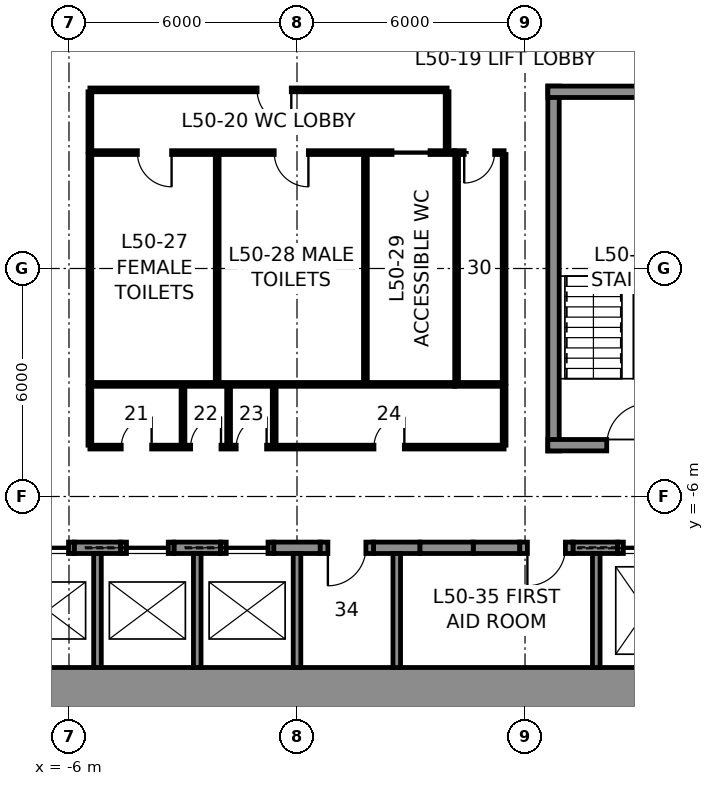
"""IFC4 building model, lengths in metres.
Left out: names, types, materials, properties, quantities, classifications, styles, units other than length and angle.
Written with IfcOpenShell. Run it as: python <this file> out.ifc"""

import sys

from ifc_helpers import new_model, si_unit, direction, frame, frame_2d, origin, place, context, subcontext, project, spatial, rectangle, extrude, element, fill, save


model = new_model("IFC4")
c1 = context("Model", 3, precision=1e-05, world=origin(), true_north=direction((0.0, 1.0)))
c2 = subcontext(c1, "Body", "Model", "MODEL_VIEW")
j1 = project(units=[si_unit("LENGTHUNIT", "METRE"), si_unit("PLANEANGLEUNIT", "RADIAN")], contexts=[c1])
p1 = place(None, origin())
s1 = spatial("IfcSite", under=j1, at=p1, CompositionType="ELEMENT")
p2 = place(p1, origin())
s2 = spatial("IfcBuilding", under=s1, at=p2, CompositionType="ELEMENT")
p3 = place(p2, frame((0.0, 0.0, 229.8)))
s3 = spatial("IfcBuildingStorey", under=s2, at=p3, CompositionType="ELEMENT", Elevation=229.8)
p4 = place(p3, frame((12.0, -11.25, 0.0), z_axis=(0.0, 0.0, 1.0), x_axis=(-1.0, 0.0, 0.0)))
e1 = element("IfcWall", 1, at=p4, inside=s3, PredefinedType="SHEAR", context=c2, shape_type="SweptSolid", body=[
    extrude(rectangle(XDim=24.0, YDim=1.5, at=frame_2d((12.0, 0.0))), origin(), (0.0, 0.0, 1.0), 4.0),
])
for number, where, z_axis, x_axis in (
    (2, (-5.863, -7.35, 0.0), (0.0, 0.0, 1.0), (1.0, 0.0, 0.0)),
    (3, (-3.238, -7.35, 0.0), (0.0, 0.0, 1.0), (1.0, 0.0, 0.0)),
    (4, (-0.613, -7.35, 0.0), (0.0, 0.0, 1.0), (1.0, 0.0, 0.0)),
    (5, (2.012, -7.35, 0.0), (0.0, 0.0, 1.0), (1.0, 0.0, 0.0)),
    (6, (4.637, -7.35, 0.0), (0.0, 0.0, 1.0), (1.0, 0.0, 0.0)),
):
    element("IfcWall", number, at=place(p3, frame(where, z_axis=z_axis, x_axis=x_axis)), inside=s3, PredefinedType="SHEAR", context=c2, shape_type="SweptSolid", body=[
        extrude(rectangle(XDim=1.225, YDim=0.3, at=frame_2d((0.613, 0.0))), origin(), (0.0, 0.0, 1.0), 4.0),
    ])
p5 = place(p3, frame((7.262, -7.35, 0.0), z_axis=(0.0, 0.0, 1.0), x_axis=(1.0, 0.0, 0.0)))
e7 = element("IfcWall", 7, at=p5, inside=s3, PredefinedType="SHEAR", context=c2, shape_type="SweptSolid", body=[
    extrude(rectangle(XDim=1.175, YDim=0.3, at=frame_2d((0.587, 0.0))), origin(), (0.0, 0.0, 1.0), 4.0),
])
p6 = place(p3, frame((-7.262, -7.35, 0.0), z_axis=(0.0, 0.0, 1.0), x_axis=(1.0, 0.0, 0.0)))
e8 = element("IfcWall", 8, at=p6, inside=s3, PredefinedType="PARTITIONING", context=c2, shape_type="SweptSolid", body=[
    extrude(rectangle(XDim=1.4, YDim=0.3, at=frame_2d((0.7, 0.0))), origin(), (0.0, 0.0, 1.0), 4.0),
])
p7 = place(p6, frame((0.15, 0.0, 0.0)))
e9 = element("IfcOpeningElement", 9, at=p7, cuts=e8, PredefinedType="OPENING", context=c2, shape_type="SweptSolid", body=[
    extrude(rectangle(XDim=1.1, YDim=2.3, at=frame_2d((0.55, 1.15))), frame((0.0, 0.16, 0.0), z_axis=(0.0, -1.0, 0.0), x_axis=(1.0, 0.0, 0.0)), (0.0, 0.0, 1.0), 0.32),
])
p8 = place(p3, frame((-4.637, -7.35, 0.0), z_axis=(0.0, 0.0, 1.0), x_axis=(1.0, 0.0, 0.0)))
e10 = element("IfcWall", 10, at=p8, inside=s3, PredefinedType="PARTITIONING", context=c2, shape_type="SweptSolid", body=[
    extrude(rectangle(XDim=1.4, YDim=0.3, at=frame_2d((0.7, 0.0))), origin(), (0.0, 0.0, 1.0), 4.0),
])
p9 = place(p8, frame((0.15, 0.0, 0.0)))
e11 = element("IfcOpeningElement", 11, at=p9, cuts=e10, PredefinedType="OPENING", context=c2, shape_type="SweptSolid", body=[
    extrude(rectangle(XDim=1.1, YDim=2.3, at=frame_2d((0.55, 1.15))), frame((0.0, 0.16, 0.0), z_axis=(0.0, -1.0, 0.0), x_axis=(1.0, 0.0, 0.0)), (0.0, 0.0, 1.0), 0.32),
])
p10 = place(p3, frame((-2.012, -7.35, 0.0), z_axis=(0.0, 0.0, 1.0), x_axis=(1.0, 0.0, 0.0)))
e12 = element("IfcWall", 12, at=p10, inside=s3, PredefinedType="PARTITIONING", context=c2, shape_type="SweptSolid", body=[
    extrude(rectangle(XDim=1.4, YDim=0.3, at=frame_2d((0.7, 0.0))), origin(), (0.0, 0.0, 1.0), 4.0),
])
p11 = place(p10, frame((0.15, 0.0, 0.0)))
e13 = element("IfcOpeningElement", 13, at=p11, cuts=e12, PredefinedType="OPENING", context=c2, shape_type="SweptSolid", body=[
    extrude(rectangle(XDim=1.1, YDim=2.3, at=frame_2d((0.55, 1.15))), frame((0.0, 0.16, 0.0), z_axis=(0.0, -1.0, 0.0), x_axis=(1.0, 0.0, 0.0)), (0.0, 0.0, 1.0), 0.32),
])
p12 = place(p3, frame((0.613, -7.35, 0.0), z_axis=(0.0, 0.0, 1.0), x_axis=(1.0, 0.0, 0.0)))
e14 = element("IfcWall", 14, at=p12, inside=s3, PredefinedType="PARTITIONING", context=c2, shape_type="SweptSolid", body=[
    extrude(rectangle(XDim=1.4, YDim=0.3, at=frame_2d((0.7, 0.0))), origin(), (0.0, 0.0, 1.0), 4.0),
])
p13 = place(p12, frame((0.2, 0.0, 0.0)))
e15 = element("IfcOpeningElement", 15, at=p13, cuts=e14, PredefinedType="OPENING", context=c2, shape_type="SweptSolid", body=[
    extrude(rectangle(XDim=1.0, YDim=2.3, at=frame_2d((0.5, 1.15))), frame((0.0, 0.16, 0.0), z_axis=(0.0, -1.0, 0.0), x_axis=(1.0, 0.0, 0.0)), (0.0, 0.0, 1.0), 0.32),
])
p14 = place(p3, frame((3.238, -7.35, 0.0), z_axis=(0.0, 0.0, 1.0), x_axis=(1.0, 0.0, 0.0)))
e16 = element("IfcWall", 16, at=p14, inside=s3, PredefinedType="PARTITIONING", context=c2, shape_type="SweptSolid", body=[
    extrude(rectangle(XDim=1.4, YDim=0.3, at=frame_2d((0.7, 0.0))), origin(), (0.0, 0.0, 1.0), 4.0),
])
p15 = place(p3, frame((5.863, -7.35, 0.0), z_axis=(0.0, 0.0, 1.0), x_axis=(1.0, 0.0, 0.0)))
e17 = element("IfcWall", 17, at=p15, inside=s3, PredefinedType="PARTITIONING", context=c2, shape_type="SweptSolid", body=[
    extrude(rectangle(XDim=1.4, YDim=0.3, at=frame_2d((0.7, 0.0))), origin(), (0.0, 0.0, 1.0), 4.0),
])
p16 = place(p15, frame((0.2, 0.0, 0.0)))
e18 = element("IfcOpeningElement", 18, at=p16, cuts=e17, PredefinedType="OPENING", context=c2, shape_type="SweptSolid", body=[
    extrude(rectangle(XDim=1.0, YDim=2.3, at=frame_2d((0.5, 1.15))), frame((0.0, 0.16, 0.0), z_axis=(0.0, -1.0, 0.0), x_axis=(1.0, 0.0, 0.0)), (0.0, 0.0, 1.0), 0.32),
])
p17 = place(p3, frame((8.438, -7.35, 0.0), z_axis=(0.0, 0.0, 1.0), x_axis=(1.0, 0.0, 0.0)))
e19 = element("IfcWall", 19, at=p17, inside=s3, PredefinedType="PARTITIONING", context=c2, shape_type="SweptSolid", body=[
    extrude(rectangle(XDim=1.5, YDim=0.3, at=frame_2d((0.75, 0.0))), origin(), (0.0, 0.0, 1.0), 4.0),
])
p18 = place(p17, frame((0.15, 0.0, 0.0)))
e20 = element("IfcOpeningElement", 20, at=p18, cuts=e19, PredefinedType="OPENING", context=c2, shape_type="SweptSolid", body=[
    extrude(rectangle(XDim=1.2, YDim=2.3, at=frame_2d((0.6, 1.15))), frame((0.0, 0.16, 0.0), z_axis=(0.0, -1.0, 0.0), x_axis=(1.0, 0.0, 0.0)), (0.0, 0.0, 1.0), 0.32),
])
for number, where, z_axis, x_axis in (
    (21, (-5.25, -10.5, 0.0), (0.0, 0.0, 1.0), (0.0, 1.0, 0.0)),
    (22, (-2.625, -10.5, 0.0), (0.0, 0.0, 1.0), (0.0, 1.0, 0.0)),
    (23, (0.0, -10.5, 0.0), (0.0, 0.0, 1.0), (0.0, 1.0, 0.0)),
    (24, (2.625, -10.5, 0.0), (0.0, 0.0, 1.0), (0.0, 1.0, 0.0)),
    (25, (7.875, -10.5, 0.0), (0.0, 0.0, 1.0), (0.0, 1.0, 0.0)),
):
    element("IfcWall", number, at=place(p3, frame(where, z_axis=z_axis, x_axis=x_axis)), inside=s3, PredefinedType="PARTITIONING", context=c2, shape_type="SweptSolid", body=[
        extrude(rectangle(XDim=3.0, YDim=0.2, at=frame_2d((1.5, 0.0))), origin(), (0.0, 0.0, 1.0), 4.0),
    ])
p19 = place(p3, frame((6.75, -4.8, 0.0), z_axis=(0.0, 0.0, 1.0), x_axis=(0.0, 1.0, 0.0)))
e26 = element("IfcWall", 26, at=p19, inside=s3, PredefinedType="SOLIDWALL", context=c2, shape_type="SweptSolid", body=[
    extrude(rectangle(XDim=9.6, YDim=0.3, at=frame_2d((4.8, 0.0))), origin(), (0.0, 0.0, 1.0), 3.75),
])
p20 = place(p3, frame((6.6, 4.65, 0.0), z_axis=(0.0, 0.0, 1.0), x_axis=(1.0, 0.0, 0.0)))
e27 = element("IfcWall", 27, at=p20, inside=s3, PredefinedType="SOLIDWALL", context=c2, shape_type="SweptSolid", body=[
    extrude(rectangle(XDim=3.9, YDim=0.3, at=frame_2d((1.95, 0.0))), origin(), (0.0, 0.0, 1.0), 3.75),
])
p21 = place(p3, frame((10.5, -4.65, 0.0), z_axis=(0.0, 0.0, 1.0), x_axis=(-1.0, 0.0, 0.0)))
e28 = element("IfcWall", 28, at=p21, inside=s3, PredefinedType="SOLIDWALL", context=c2, shape_type="SweptSolid", body=[
    extrude(rectangle(XDim=3.9, YDim=0.3, at=frame_2d((1.95, 0.0))), origin(), (0.0, 0.0, 1.0), 3.75),
])
p22 = place(p21, frame((1.25, 0.0, 0.0)))
e29 = element("IfcOpeningElement", 29, at=p22, cuts=e28, PredefinedType="OPENING", context=c2, shape_type="SweptSolid", body=[
    extrude(rectangle(XDim=1.1, YDim=2.3, at=frame_2d((0.55, 1.15))), frame((0.0, 0.16, 0.0), z_axis=(0.0, -1.0, 0.0), x_axis=(1.0, 0.0, 0.0)), (0.0, 0.0, 1.0), 0.32),
])
p23 = place(p3, frame((-5.45, 3.05, 0.0), z_axis=(0.0, 0.0, 1.0), x_axis=(1.0, 0.0, 0.0)))
e30 = element("IfcWall", 30, at=p23, inside=s3, PredefinedType="PARTITIONING", context=c2, shape_type="SweptSolid", body=[
    extrude(rectangle(XDim=9.6, YDim=0.1, at=frame_2d((4.8, 0.0))), origin(), (0.0, 0.0, 1.0), 3.75),
])
p24 = place(p23, frame((1.25, 0.0, 0.0)))
e31 = element("IfcOpeningElement", 31, at=p24, cuts=e30, PredefinedType="OPENING", context=c2, shape_type="SweptSolid", body=[
    extrude(rectangle(XDim=0.9, YDim=2.3, at=frame_2d((0.45, 1.15))), frame((0.0, 0.06, 0.0), z_axis=(0.0, -1.0, 0.0), x_axis=(1.0, 0.0, 0.0)), (0.0, 0.0, 1.0), 0.12),
])
p25 = place(p23, frame((4.85, 0.0, 0.0)))
e32 = element("IfcOpeningElement", 32, at=p25, cuts=e30, PredefinedType="OPENING", context=c2, shape_type="SweptSolid", body=[
    extrude(rectangle(XDim=0.9, YDim=2.3, at=frame_2d((0.45, 1.15))), frame((0.0, 0.06, 0.0), z_axis=(0.0, -1.0, 0.0), x_axis=(1.0, 0.0, 0.0)), (0.0, 0.0, 1.0), 0.12),
])
p26 = place(p23, frame((7.95, 0.0, 0.0)))
e33 = element("IfcOpeningElement", 33, at=p26, cuts=e30, PredefinedType="OPENING", context=c2, shape_type="SweptSolid", body=[
    extrude(rectangle(XDim=1.0, YDim=2.3, at=frame_2d((0.5, 1.15))), frame((0.0, 0.06, 0.0), z_axis=(0.0, -1.0, 0.0), x_axis=(1.0, 0.0, 0.0)), (0.0, 0.0, 1.0), 0.12),
])
p27 = place(p3, frame((4.15, 3.05, 0.0), z_axis=(0.0, 0.0, 1.0), x_axis=(1.0, 0.0, 0.0)))
e34 = element("IfcWall", 34, at=p27, inside=s3, PredefinedType="PARTITIONING", context=c2, shape_type="SweptSolid", body=[
    extrude(rectangle(XDim=1.3, YDim=0.1, at=frame_2d((0.65, 0.0))), origin(), (0.0, 0.0, 1.0), 3.75),
])
p28 = place(p27, frame((0.25, 0.0, 0.0)))
e35 = element("IfcOpeningElement", 35, at=p28, cuts=e34, PredefinedType="OPENING", context=c2, shape_type="SweptSolid", body=[
    extrude(rectangle(XDim=0.8, YDim=2.3, at=frame_2d((0.4, 1.15))), frame((0.0, 0.06, 0.0), z_axis=(0.0, -1.0, 0.0), x_axis=(1.0, 0.0, 0.0)), (0.0, 0.0, 1.0), 0.12),
])
p29 = place(p3, frame((4.15, -3.05, 0.0), z_axis=(0.0, 0.0, 1.0), x_axis=(-1.0, 0.0, 0.0)))
e36 = element("IfcWall", 36, at=p29, inside=s3, PredefinedType="PARTITIONING", context=c2, shape_type="SweptSolid", body=[
    extrude(rectangle(XDim=9.6, YDim=0.1, at=frame_2d((4.8, 0.0))), origin(), (0.0, 0.0, 1.0), 3.75),
])
p30 = place(p3, frame((5.45, -3.05, 0.0), z_axis=(0.0, 0.0, 1.0), x_axis=(-1.0, 0.0, 0.0)))
e37 = element("IfcWall", 37, at=p30, inside=s3, PredefinedType="PARTITIONING", context=c2, shape_type="SweptSolid", body=[
    extrude(rectangle(XDim=1.3, YDim=0.1, at=frame_2d((0.65, 0.0))), origin(), (0.0, 0.0, 1.0), 3.75),
])
for number, where, z_axis, x_axis in (
    (38, (5.45, 3.0, 0.0), (0.0, 0.0, 1.0), (0.0, -1.0, 0.0)),
    (39, (-5.45, -3.0, 0.0), (0.0, 0.0, 1.0), (0.0, 1.0, 0.0)),
    (40, (-2.1, -3.0, 0.0), (0.0, 0.0, 1.0), (0.0, 1.0, 0.0)),
    (41, (1.8, -3.0, 0.0), (0.0, 0.0, 1.0), (0.0, 1.0, 0.0)),
    (42, (4.2, -3.0, 0.0), (0.0, 0.0, 1.0), (0.0, 1.0, 0.0)),
):
    element("IfcWall", number, at=place(p3, frame(where, z_axis=z_axis, x_axis=x_axis)), inside=s3, PredefinedType="PARTITIONING", context=c2, shape_type="SweptSolid", body=[
        extrude(rectangle(XDim=6.0, YDim=0.1, at=frame_2d((3.0, 0.0))), origin(), (0.0, 0.0, 1.0), 3.75),
    ])
p31 = place(p3, frame((-5.45, 4.7, 0.0), z_axis=(0.0, 0.0, 1.0), x_axis=(1.0, 0.0, 0.0)))
e43 = element("IfcWall", 43, at=p31, inside=s3, PredefinedType="PARTITIONING", context=c2, shape_type="SweptSolid", body=[
    extrude(rectangle(XDim=9.4, YDim=0.1, at=frame_2d((4.7, 0.0))), origin(), (0.0, 0.0, 1.0), 3.75),
])
p32 = place(p31, frame((4.4, 0.0, 0.0)))
e44 = element("IfcOpeningElement", 44, at=p32, cuts=e43, PredefinedType="OPENING", context=c2, shape_type="SweptSolid", body=[
    extrude(rectangle(XDim=0.9, YDim=2.3, at=frame_2d((0.45, 1.15))), frame((0.0, 0.06, 0.0), z_axis=(0.0, -1.0, 0.0), x_axis=(1.0, 0.0, 0.0)), (0.0, 0.0, 1.0), 0.12),
])
for number, where, z_axis, x_axis in (
    (45, (-5.45, 3.1, 0.0), (0.0, 0.0, 1.0), (0.0, 1.0, 0.0)),
    (46, (3.95, 3.1, 0.0), (0.0, 0.0, 1.0), (0.0, 1.0, 0.0)),
):
    element("IfcWall", number, at=place(p3, frame(where, z_axis=z_axis, x_axis=x_axis)), inside=s3, PredefinedType="PARTITIONING", context=c2, shape_type="SweptSolid", body=[
        extrude(rectangle(XDim=1.55, YDim=0.1, at=frame_2d((0.775, 0.0))), origin(), (0.0, 0.0, 1.0), 3.75),
    ])
p33 = place(p3, frame((5.45, -4.7, 0.0), z_axis=(0.0, 0.0, 1.0), x_axis=(-1.0, 0.0, 0.0)))
e47 = element("IfcWall", 47, at=p33, inside=s3, PredefinedType="PARTITIONING", context=c2, shape_type="SweptSolid", body=[
    extrude(rectangle(XDim=10.9, YDim=0.1, at=frame_2d((5.45, 0.0))), origin(), (0.0, 0.0, 1.0), 3.75),
])
p34 = place(p33, frame((9.275, 0.0, 0.0)))
e48 = element("IfcOpeningElement", 48, at=p34, cuts=e47, PredefinedType="OPENING", context=c2, shape_type="SweptSolid", body=[
    extrude(rectangle(XDim=0.8, YDim=2.3, at=frame_2d((0.4, 1.15))), frame((0.0, 0.06, 0.0), z_axis=(0.0, -1.0, 0.0), x_axis=(1.0, 0.0, 0.0)), (0.0, 0.0, 1.0), 0.12),
])
p35 = place(p33, frame((7.45, 0.0, 0.0)))
e49 = element("IfcOpeningElement", 49, at=p35, cuts=e47, PredefinedType="OPENING", context=c2, shape_type="SweptSolid", body=[
    extrude(rectangle(XDim=0.8, YDim=2.3, at=frame_2d((0.4, 1.15))), frame((0.0, 0.06, 0.0), z_axis=(0.0, -1.0, 0.0), x_axis=(1.0, 0.0, 0.0)), (0.0, 0.0, 1.0), 0.12),
])
p36 = place(p33, frame((6.25, 0.0, 0.0)))
e50 = element("IfcOpeningElement", 50, at=p36, cuts=e47, PredefinedType="OPENING", context=c2, shape_type="SweptSolid", body=[
    extrude(rectangle(XDim=0.8, YDim=2.3, at=frame_2d((0.4, 1.15))), frame((0.0, 0.06, 0.0), z_axis=(0.0, -1.0, 0.0), x_axis=(1.0, 0.0, 0.0)), (0.0, 0.0, 1.0), 0.12),
])
p37 = place(p33, frame((2.625, 0.0, 0.0)))
e51 = element("IfcOpeningElement", 51, at=p37, cuts=e47, PredefinedType="OPENING", context=c2, shape_type="SweptSolid", body=[
    extrude(rectangle(XDim=0.8, YDim=2.3, at=frame_2d((0.4, 1.15))), frame((0.0, 0.06, 0.0), z_axis=(0.0, -1.0, 0.0), x_axis=(1.0, 0.0, 0.0)), (0.0, 0.0, 1.0), 0.12),
])
for number, where, z_axis, x_axis in (
    (52, (-5.45, -3.1, 0.0), (0.0, 0.0, 1.0), (0.0, -1.0, 0.0)),
    (53, (5.45, -3.1, 0.0), (0.0, 0.0, 1.0), (0.0, -1.0, 0.0)),
    (54, (-3.0, -3.1, 0.0), (0.0, 0.0, 1.0), (0.0, -1.0, 0.0)),
    (55, (-1.8, -3.1, 0.0), (0.0, 0.0, 1.0), (0.0, -1.0, 0.0)),
    (56, (-0.6, -3.1, 0.0), (0.0, 0.0, 1.0), (0.0, -1.0, 0.0)),
):
    element("IfcWall", number, at=place(p3, frame(where, z_axis=z_axis, x_axis=x_axis)), inside=s3, PredefinedType="PARTITIONING", context=c2, shape_type="SweptSolid", body=[
        extrude(rectangle(XDim=1.55, YDim=0.1, at=frame_2d((0.775, 0.0))), origin(), (0.0, 0.0, 1.0), 3.75),
    ])
p38 = place(p22, frame((1.1, 0.0, 0.0), z_axis=(0.0, 0.0, 1.0), x_axis=(-1.0, 0.0, 0.0)))
e57 = element("IfcDoor", 57, at=p38, inside=s3, OperationType="SINGLE_SWING_RIGHT", PredefinedType="DOOR", context=c2, shape_type="SweptSolid", body=[
    extrude(rectangle(XDim=1.1, YDim=2.3, at=frame_2d((0.55, 1.15))), frame((0.0, 0.025, 0.0), z_axis=(0.0, -1.0, 0.0), x_axis=(1.0, 0.0, 0.0)), (0.0, 0.0, 1.0), 0.05),
])
fill(e29, e57)
p39 = place(p24, frame((0.9, 0.0, 0.0), z_axis=(0.0, 0.0, 1.0), x_axis=(-1.0, 0.0, 0.0)))
e58 = element("IfcDoor", 58, at=p39, inside=s3, OperationType="SINGLE_SWING_LEFT", PredefinedType="DOOR", context=c2, shape_type="SweptSolid", body=[
    extrude(rectangle(XDim=0.9, YDim=2.3, at=frame_2d((0.45, 1.15))), frame((0.0, 0.025, 0.0), z_axis=(0.0, -1.0, 0.0), x_axis=(1.0, 0.0, 0.0)), (0.0, 0.0, 1.0), 0.05),
])
fill(e31, e58)
p40 = place(p25, frame((0.9, 0.0, 0.0), z_axis=(0.0, 0.0, 1.0), x_axis=(-1.0, 0.0, 0.0)))
e59 = element("IfcDoor", 59, at=p40, inside=s3, OperationType="SINGLE_SWING_LEFT", PredefinedType="DOOR", context=c2, shape_type="SweptSolid", body=[
    extrude(rectangle(XDim=0.9, YDim=2.3, at=frame_2d((0.45, 1.15))), frame((0.0, 0.025, 0.0), z_axis=(0.0, -1.0, 0.0), x_axis=(1.0, 0.0, 0.0)), (0.0, 0.0, 1.0), 0.05),
])
fill(e32, e59)
p41 = place(p26, frame((1.0, 0.0, 0.0), z_axis=(0.0, 0.0, 1.0), x_axis=(-1.0, 0.0, 0.0)))
e60 = element("IfcDoor", 60, at=p41, inside=s3, OperationType="SLIDING_TO_LEFT", PredefinedType="DOOR", context=c2, shape_type="SweptSolid", body=[
    extrude(rectangle(XDim=1.0, YDim=2.3, at=frame_2d((0.5, 1.15))), frame((0.0, 0.025, 0.0), z_axis=(0.0, -1.0, 0.0), x_axis=(1.0, 0.0, 0.0)), (0.0, 0.0, 1.0), 0.05),
])
fill(e33, e60)
p42 = place(p28, frame((0.8, 0.0, 0.0), z_axis=(0.0, 0.0, 1.0), x_axis=(-1.0, 0.0, 0.0)))
e61 = element("IfcDoor", 61, at=p42, inside=s3, OperationType="SINGLE_SWING_RIGHT", PredefinedType="DOOR", context=c2, shape_type="SweptSolid", body=[
    extrude(rectangle(XDim=0.8, YDim=2.3, at=frame_2d((0.4, 1.15))), frame((0.0, 0.025, 0.0), z_axis=(0.0, -1.0, 0.0), x_axis=(1.0, 0.0, 0.0)), (0.0, 0.0, 1.0), 0.05),
])
fill(e35, e61)
p43 = place(p32, frame((0.9, 0.0, 0.0), z_axis=(0.0, 0.0, 1.0), x_axis=(-1.0, 0.0, 0.0)))
e62 = element("IfcDoor", 62, at=p43, inside=s3, OperationType="SINGLE_SWING_LEFT", PredefinedType="DOOR", context=c2, shape_type="SweptSolid", body=[
    extrude(rectangle(XDim=0.9, YDim=2.3, at=frame_2d((0.45, 1.15))), frame((0.0, 0.025, 0.0), z_axis=(0.0, -1.0, 0.0), x_axis=(1.0, 0.0, 0.0)), (0.0, 0.0, 1.0), 0.05),
])
fill(e44, e62)
p44 = place(p34, frame((0.8, 0.0, 0.0), z_axis=(0.0, 0.0, 1.0), x_axis=(-1.0, 0.0, 0.0)))
e63 = element("IfcDoor", 63, at=p44, inside=s3, OperationType="SINGLE_SWING_RIGHT", PredefinedType="DOOR", context=c2, shape_type="SweptSolid", body=[
    extrude(rectangle(XDim=0.8, YDim=2.3, at=frame_2d((0.4, 1.15))), frame((0.0, 0.025, 0.0), z_axis=(0.0, -1.0, 0.0), x_axis=(1.0, 0.0, 0.0)), (0.0, 0.0, 1.0), 0.05),
])
fill(e48, e63)
p45 = place(p35, frame((0.8, 0.0, 0.0), z_axis=(0.0, 0.0, 1.0), x_axis=(-1.0, 0.0, 0.0)))
e64 = element("IfcDoor", 64, at=p45, inside=s3, OperationType="SINGLE_SWING_RIGHT", PredefinedType="DOOR", context=c2, shape_type="SweptSolid", body=[
    extrude(rectangle(XDim=0.8, YDim=2.3, at=frame_2d((0.4, 1.15))), frame((0.0, 0.025, 0.0), z_axis=(0.0, -1.0, 0.0), x_axis=(1.0, 0.0, 0.0)), (0.0, 0.0, 1.0), 0.05),
])
fill(e49, e64)
p46 = place(p36, frame((0.8, 0.0, 0.0), z_axis=(0.0, 0.0, 1.0), x_axis=(-1.0, 0.0, 0.0)))
e65 = element("IfcDoor", 65, at=p46, inside=s3, OperationType="SINGLE_SWING_RIGHT", PredefinedType="DOOR", context=c2, shape_type="SweptSolid", body=[
    extrude(rectangle(XDim=0.8, YDim=2.3, at=frame_2d((0.4, 1.15))), frame((0.0, 0.025, 0.0), z_axis=(0.0, -1.0, 0.0), x_axis=(1.0, 0.0, 0.0)), (0.0, 0.0, 1.0), 0.05),
])
fill(e50, e65)
p47 = place(p37, frame((0.8, 0.0, 0.0), z_axis=(0.0, 0.0, 1.0), x_axis=(-1.0, 0.0, 0.0)))
e66 = element("IfcDoor", 66, at=p47, inside=s3, OperationType="SINGLE_SWING_RIGHT", PredefinedType="DOOR", context=c2, shape_type="SweptSolid", body=[
    extrude(rectangle(XDim=0.8, YDim=2.3, at=frame_2d((0.4, 1.15))), frame((0.0, 0.025, 0.0), z_axis=(0.0, -1.0, 0.0), x_axis=(1.0, 0.0, 0.0)), (0.0, 0.0, 1.0), 0.05),
])
fill(e51, e66)
p48 = place(p13, frame((1.0, 0.0, 0.0), z_axis=(0.0, 0.0, 1.0), x_axis=(-1.0, 0.0, 0.0)))
e67 = element("IfcDoor", 67, at=p48, inside=s3, OperationType="SINGLE_SWING_RIGHT", PredefinedType="DOOR", context=c2, shape_type="SweptSolid", body=[
    extrude(rectangle(XDim=1.0, YDim=2.3, at=frame_2d((0.5, 1.15))), frame((0.0, 0.025, 0.0), z_axis=(0.0, -1.0, 0.0), x_axis=(1.0, 0.0, 0.0)), (0.0, 0.0, 1.0), 0.05),
])
fill(e15, e67)
p49 = place(p16, frame((1.0, 0.0, 0.0), z_axis=(0.0, 0.0, 1.0), x_axis=(-1.0, 0.0, 0.0)))
e68 = element("IfcDoor", 68, at=p49, inside=s3, OperationType="SINGLE_SWING_RIGHT", PredefinedType="DOOR", context=c2, shape_type="SweptSolid", body=[
    extrude(rectangle(XDim=1.0, YDim=2.3, at=frame_2d((0.5, 1.15))), frame((0.0, 0.025, 0.0), z_axis=(0.0, -1.0, 0.0), x_axis=(1.0, 0.0, 0.0)), (0.0, 0.0, 1.0), 0.05),
])
fill(e18, e68)
p50 = place(p18, origin())
e69 = element("IfcDoor", 69, at=p50, inside=s3, OperationType="SLIDING_TO_LEFT", PredefinedType="DOOR", context=c2, shape_type="SweptSolid", body=[
    extrude(rectangle(XDim=1.2, YDim=2.3, at=frame_2d((0.6, 1.15))), frame((0.0, 0.025, 0.0), z_axis=(0.0, -1.0, 0.0), x_axis=(1.0, 0.0, 0.0)), (0.0, 0.0, 1.0), 0.05),
])
fill(e20, e69)
p51 = place(p11, origin())
e70 = element("IfcDoor", 70, at=p51, inside=s3, OperationType="SLIDING_TO_LEFT", PredefinedType="DOOR", context=c2, shape_type="SweptSolid", body=[
    extrude(rectangle(XDim=1.1, YDim=2.3, at=frame_2d((0.55, 1.15))), frame((0.0, 0.025, 0.0), z_axis=(0.0, -1.0, 0.0), x_axis=(1.0, 0.0, 0.0)), (0.0, 0.0, 1.0), 0.05),
])
fill(e13, e70)
p52 = place(p9, origin())
e71 = element("IfcDoor", 71, at=p52, inside=s3, OperationType="SLIDING_TO_LEFT", PredefinedType="DOOR", context=c2, shape_type="SweptSolid", body=[
    extrude(rectangle(XDim=1.1, YDim=2.3, at=frame_2d((0.55, 1.15))), frame((0.0, 0.025, 0.0), z_axis=(0.0, -1.0, 0.0), x_axis=(1.0, 0.0, 0.0)), (0.0, 0.0, 1.0), 0.05),
])
fill(e11, e71)
p53 = place(p7, origin())
e72 = element("IfcDoor", 72, at=p53, inside=s3, OperationType="SLIDING_TO_LEFT", PredefinedType="DOOR", context=c2, shape_type="SweptSolid", body=[
    extrude(rectangle(XDim=1.1, YDim=2.3, at=frame_2d((0.55, 1.15))), frame((0.0, 0.025, 0.0), z_axis=(0.0, -1.0, 0.0), x_axis=(1.0, 0.0, 0.0)), (0.0, 0.0, 1.0), 0.05),
])
fill(e9, e72)
save(model, sys.argv[1])
